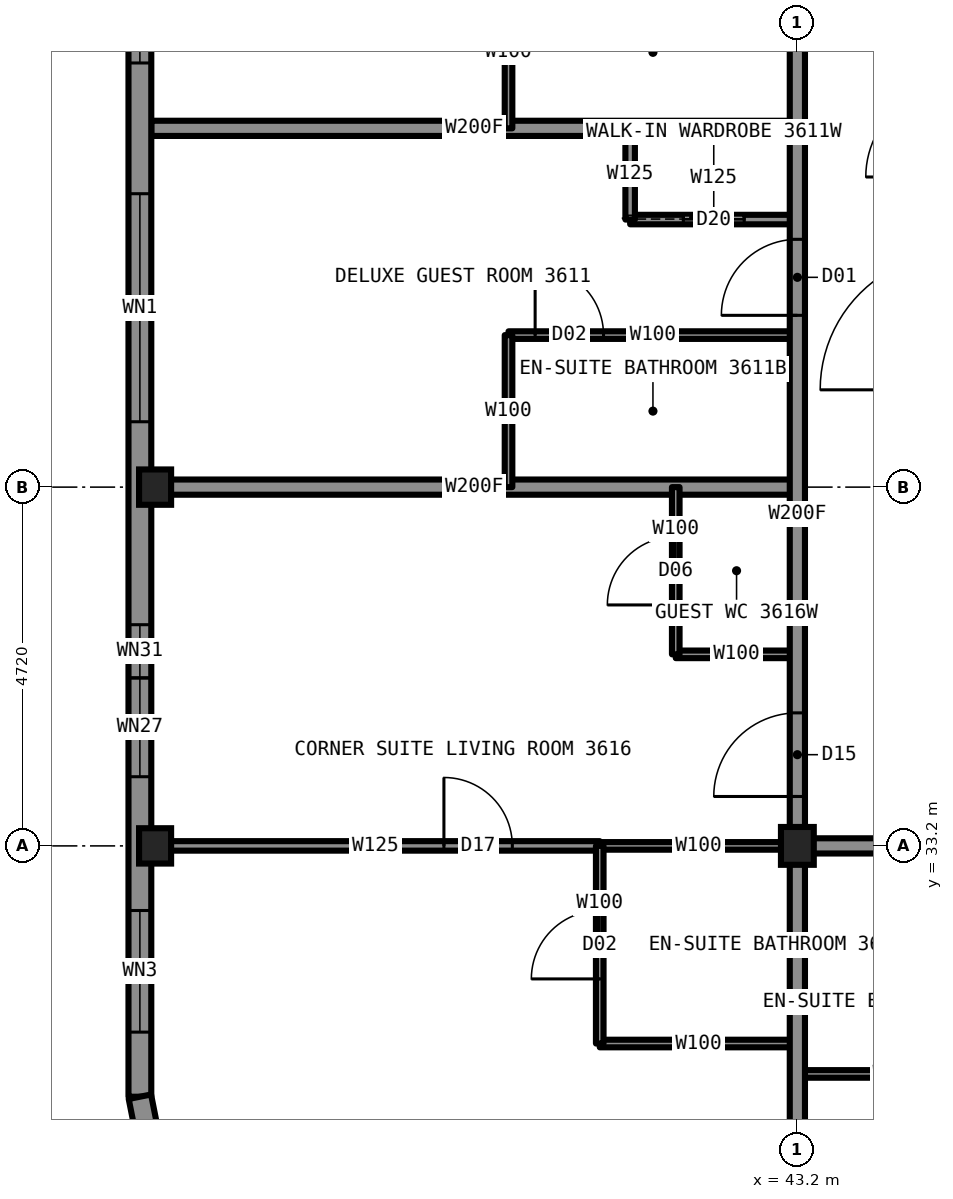
"""IFC4 building model, lengths in metres.
Left out: names, types, materials, properties, quantities, classifications, styles, units other than length and angle.
Written with IfcOpenShell. Run it as: python <this file> out.ifc"""

import sys

from ifc_helpers import new_model, si_unit, direction, frame, frame_2d, origin, origin_2d, place, context, subcontext, project, spatial, rectangle, i_section, extrude, element, fill, save


model = new_model("IFC4")
c1 = context("Model", 3, precision=1e-05, world=origin(), true_north=direction((0.0, 1.0)))
c2 = subcontext(c1, "Body", "Model", "MODEL_VIEW")
j1 = project(units=[si_unit("LENGTHUNIT", "METRE"), si_unit("PLANEANGLEUNIT", "RADIAN")], contexts=[c1])
p1 = place(None, origin())
s1 = spatial("IfcSite", under=j1, at=p1, CompositionType="ELEMENT")
p2 = place(p1, origin())
s2 = spatial("IfcBuilding", under=s1, at=p2, CompositionType="ELEMENT")
p3 = place(p2, frame((0.0, 0.0, 135.4)))
s3 = spatial("IfcBuildingStorey", under=s2, at=p3, CompositionType="ELEMENT", Elevation=135.4)
for number, where, z_axis, x_axis in (
    (1, (34.75, 33.2, 0.0), (0.0, 0.0, 1.0), (1.0, 0.0, 0.0)),
    (2, (34.75, 37.92, 0.0), (0.0, 0.0, 1.0), (1.0, 0.0, 0.0)),
):
    element("IfcColumn", number, at=place(p3, frame(where, z_axis=z_axis, x_axis=x_axis)), inside=s3, PredefinedType="COLUMN", context=c2, shape_type="SweptSolid", body=[
        extrude(i_section(OverallWidth=0.422, OverallDepth=0.465, WebThickness=0.045, FlangeThickness=0.073, at=origin_2d()), origin(), (0.0, 0.0, 1.0), 3.5),
    ])
p4 = place(p3, frame((43.2, 33.2, 0.0), z_axis=(0.0, 0.0, 1.0), x_axis=(1.0, 0.0, 0.0)))
e3 = element("IfcColumn", 3, at=p4, inside=s3, PredefinedType="COLUMN", context=c2, shape_type="SweptSolid", body=[
    extrude(i_section(OverallWidth=0.432, OverallDepth=0.498, WebThickness=0.056, FlangeThickness=0.089, at=origin_2d()), origin(), (0.0, 0.0, 1.0), 3.5),
])
p5 = place(p3, frame((40.6, 33.2, 0.0), z_axis=(0.0, 0.0, 1.0), x_axis=(1.0, 0.0, 0.0)))
e4 = element("IfcWall", 4, at=p5, inside=s3, PredefinedType="PARTITIONING", context=c2, shape_type="SweptSolid", body=[
    extrude(rectangle(XDim=2.6, YDim=0.1, at=frame_2d((1.3, 0.0))), origin(), (0.0, 0.0, 1.0), 2.573),
])
p6 = place(p3, frame((43.2, 33.2, 0.0), z_axis=(0.0, 0.0, 1.0), x_axis=(1.0, 0.0, 0.0)))
e5 = element("IfcWall", 5, at=p6, inside=s3, PredefinedType="PARTITIONING", context=c2, shape_type="SweptSolid", body=[
    extrude(rectangle(XDim=23.6, YDim=0.2, at=frame_2d((11.8, 0.0))), origin(), (0.0, 0.0, 1.0), 3.33),
])
p7 = place(p6, frame((3.0, 0.0, 0.0)))
e6 = element("IfcOpeningElement", 6, at=p7, cuts=e5, PredefinedType="OPENING", context=c2, shape_type="SweptSolid", body=[
    extrude(rectangle(XDim=1.0, YDim=2.2, at=frame_2d((0.5, 1.1))), frame((0.0, 0.11, 0.0), z_axis=(0.0, -1.0, 0.0), x_axis=(1.0, 0.0, 0.0)), (0.0, 0.0, 1.0), 0.22),
])
p8 = place(p6, frame((9.84, 0.0, 0.0)))
e7 = element("IfcOpeningElement", 7, at=p8, cuts=e5, PredefinedType="OPENING", context=c2, shape_type="SweptSolid", body=[
    extrude(rectangle(XDim=1.0, YDim=2.2, at=frame_2d((0.5, 1.1))), frame((0.0, 0.11, 0.0), z_axis=(0.0, -1.0, 0.0), x_axis=(1.0, 0.0, 0.0)), (0.0, 0.0, 1.0), 0.22),
])
p9 = place(p6, frame((16.71, 0.0, 0.0)))
e8 = element("IfcOpeningElement", 8, at=p9, cuts=e5, PredefinedType="OPENING", context=c2, shape_type="SweptSolid", body=[
    extrude(rectangle(XDim=1.0, YDim=2.2, at=frame_2d((0.5, 1.1))), frame((0.0, 0.11, 0.0), z_axis=(0.0, -1.0, 0.0), x_axis=(1.0, 0.0, 0.0)), (0.0, 0.0, 1.0), 0.22),
])
p10 = place(p6, frame((20.34, 0.0, 0.0)))
e9 = element("IfcOpeningElement", 9, at=p10, cuts=e5, PredefinedType="OPENING", context=c2, shape_type="SweptSolid", body=[
    extrude(rectangle(XDim=1.0, YDim=2.2, at=frame_2d((0.5, 1.1))), frame((0.0, 0.11, 0.0), z_axis=(0.0, -1.0, 0.0), x_axis=(1.0, 0.0, 0.0)), (0.0, 0.0, 1.0), 0.22),
])
p11 = place(p3, frame((34.7, 33.2, 0.0), z_axis=(0.0, 0.0, 1.0), x_axis=(1.0, 0.0, 0.0)))
e10 = element("IfcWall", 10, at=p11, inside=s3, PredefinedType="PARTITIONING", context=c2, shape_type="SweptSolid", body=[
    extrude(rectangle(XDim=5.9, YDim=0.125, at=frame_2d((2.95, 0.0))), origin(), (0.0, 0.0, 1.0), 2.573),
])
p12 = place(p11, frame((3.85, 0.0, 0.0)))
e11 = element("IfcOpeningElement", 11, at=p12, cuts=e10, PredefinedType="OPENING", context=c2, shape_type="SweptSolid", body=[
    extrude(rectangle(XDim=0.9, YDim=2.2, at=frame_2d((0.45, 1.1))), frame((0.0, 0.073, 0.0), z_axis=(0.0, -1.0, 0.0), x_axis=(1.0, 0.0, 0.0)), (0.0, 0.0, 1.0), 0.145),
])
p13 = place(p3, frame((40.6, 30.6, 0.0), z_axis=(0.0, 0.0, 1.0), x_axis=(1.0, 0.0, 0.0)))
e12 = element("IfcWall", 12, at=p13, inside=s3, PredefinedType="PARTITIONING", context=c2, shape_type="SweptSolid", body=[
    extrude(rectangle(XDim=2.6, YDim=0.1, at=frame_2d((1.3, 0.0))), origin(), (0.0, 0.0, 1.0), 3.33),
])
p14 = place(p3, frame((43.2, 30.2, 0.0), z_axis=(0.0, 0.0, 1.0), x_axis=(1.0, 0.0, 0.0)))
e13 = element("IfcWall", 13, at=p14, inside=s3, PredefinedType="PARTITIONING", context=c2, shape_type="SweptSolid", body=[
    extrude(rectangle(XDim=2.6, YDim=0.1, at=frame_2d((1.3, 0.0))), origin(), (0.0, 0.0, 1.0), 3.33),
])
p15 = place(p3, frame((34.7, 42.64, 0.0), z_axis=(0.0, 0.0, 1.0), x_axis=(1.0, 0.0, 0.0)))
e14 = element("IfcWall", 14, at=p15, inside=s3, PredefinedType="PARTITIONING", context=c2, shape_type="SweptSolid", body=[
    extrude(rectangle(XDim=8.5, YDim=0.2, at=frame_2d((4.25, 0.0))), origin(), (0.0, 0.0, 1.0), 2.731),
])
p16 = place(p3, frame((41.0, 41.44, 0.0), z_axis=(0.0, 0.0, 1.0), x_axis=(1.0, 0.0, 0.0)))
e15 = element("IfcWall", 15, at=p16, inside=s3, PredefinedType="PARTITIONING", context=c2, shape_type="SweptSolid", body=[
    extrude(rectangle(XDim=2.2, YDim=0.125, at=frame_2d((1.1, 0.0))), origin(), (0.0, 0.0, 1.0), 3.33),
])
p17 = place(p16, frame((0.7, 0.0, 0.0)))
e16 = element("IfcOpeningElement", 16, at=p17, cuts=e15, PredefinedType="OPENING", context=c2, shape_type="SweptSolid", body=[
    extrude(rectangle(XDim=0.8, YDim=2.1, at=frame_2d((0.4, 1.05))), frame((0.0, 0.073, 0.0), z_axis=(0.0, -1.0, 0.0), x_axis=(1.0, 0.0, 0.0)), (0.0, 0.0, 1.0), 0.145),
])
p18 = place(p3, frame((39.4, 39.92, 0.0), z_axis=(0.0, 0.0, 1.0), x_axis=(1.0, 0.0, 0.0)))
e17 = element("IfcWall", 17, at=p18, inside=s3, PredefinedType="PARTITIONING", context=c2, shape_type="SweptSolid", body=[
    extrude(rectangle(XDim=3.8, YDim=0.1, at=frame_2d((1.9, 0.0))), origin(), (0.0, 0.0, 1.0), 3.33),
])
p19 = place(p18, frame((0.35, 0.0, 0.0)))
e18 = element("IfcOpeningElement", 18, at=p19, cuts=e17, PredefinedType="OPENING", context=c2, shape_type="SweptSolid", body=[
    extrude(rectangle(XDim=0.9, YDim=2.1, at=frame_2d((0.45, 1.05))), frame((0.0, 0.06, 0.0), z_axis=(0.0, -1.0, 0.0), x_axis=(1.0, 0.0, 0.0)), (0.0, 0.0, 1.0), 0.12),
])
p20 = place(p3, frame((34.7, 37.92, 0.0), z_axis=(0.0, 0.0, 1.0), x_axis=(1.0, 0.0, 0.0)))
e19 = element("IfcWall", 19, at=p20, inside=s3, PredefinedType="PARTITIONING", context=c2, shape_type="SweptSolid", body=[
    extrude(rectangle(XDim=8.5, YDim=0.2, at=frame_2d((4.25, 0.0))), origin(), (0.0, 0.0, 1.0), 2.573),
])
p21 = place(p3, frame((41.6, 35.72, 0.0), z_axis=(0.0, 0.0, 1.0), x_axis=(1.0, 0.0, 0.0)))
e20 = element("IfcWall", 20, at=p21, inside=s3, PredefinedType="PARTITIONING", context=c2, shape_type="SweptSolid", body=[
    extrude(rectangle(XDim=1.6, YDim=0.1, at=frame_2d((0.8, 0.0))), origin(), (0.0, 0.0, 1.0), 3.33),
])
p22 = place(p3, frame((43.2, 33.2, 0.0), z_axis=(0.0, 0.0, 1.0), x_axis=(0.0, 1.0, 0.0)))
e21 = element("IfcWall", 21, at=p22, inside=s3, PredefinedType="PARTITIONING", context=c2, shape_type="SweptSolid", body=[
    extrude(rectangle(XDim=23.6, YDim=0.2, at=frame_2d((11.8, 0.0))), origin(), (0.0, 0.0, 1.0), 3.33),
])
p23 = place(p22, frame((6.98, 0.0, 0.0)))
e22 = element("IfcOpeningElement", 22, at=p23, cuts=e21, PredefinedType="OPENING", context=c2, shape_type="SweptSolid", body=[
    extrude(rectangle(XDim=1.0, YDim=2.2, at=frame_2d((0.5, 1.1))), frame((0.0, 0.11, 0.0), z_axis=(0.0, -1.0, 0.0), x_axis=(1.0, 0.0, 0.0)), (0.0, 0.0, 1.0), 0.22),
])
p24 = place(p22, frame((11.7, 0.0, 0.0)))
e23 = element("IfcOpeningElement", 23, at=p24, cuts=e21, PredefinedType="OPENING", context=c2, shape_type="SweptSolid", body=[
    extrude(rectangle(XDim=1.0, YDim=2.2, at=frame_2d((0.5, 1.1))), frame((0.0, 0.11, 0.0), z_axis=(0.0, -1.0, 0.0), x_axis=(1.0, 0.0, 0.0)), (0.0, 0.0, 1.0), 0.22),
])
p25 = place(p22, frame((15.62, 0.0, 0.0)))
e24 = element("IfcOpeningElement", 24, at=p25, cuts=e21, PredefinedType="OPENING", context=c2, shape_type="SweptSolid", body=[
    extrude(rectangle(XDim=1.0, YDim=2.2, at=frame_2d((0.5, 1.1))), frame((0.0, 0.11, 0.0), z_axis=(0.0, -1.0, 0.0), x_axis=(1.0, 0.0, 0.0)), (0.0, 0.0, 1.0), 0.22),
])
p26 = place(p22, frame((21.85, 0.0, 0.0)))
e25 = element("IfcOpeningElement", 25, at=p26, cuts=e21, PredefinedType="OPENING", context=c2, shape_type="SweptSolid", body=[
    extrude(rectangle(XDim=1.1, YDim=2.2, at=frame_2d((0.55, 1.1))), frame((0.0, 0.11, 0.0), z_axis=(0.0, -1.0, 0.0), x_axis=(1.0, 0.0, 0.0)), (0.0, 0.0, 1.0), 0.22),
])
p27 = place(p22, frame((0.65, 0.0, 0.0)))
e26 = element("IfcOpeningElement", 26, at=p27, cuts=e21, PredefinedType="OPENING", context=c2, shape_type="SweptSolid", body=[
    extrude(rectangle(XDim=1.1, YDim=2.2, at=frame_2d((0.55, 1.1))), frame((0.0, 0.11, 0.0), z_axis=(0.0, -1.0, 0.0), x_axis=(1.0, 0.0, 0.0)), (0.0, 0.0, 1.0), 0.22),
])
p28 = place(p3, frame((43.2, 24.7, 0.0), z_axis=(0.0, 0.0, 1.0), x_axis=(0.0, 1.0, 0.0)))
e27 = element("IfcWall", 27, at=p28, inside=s3, PredefinedType="PARTITIONING", context=c2, shape_type="SweptSolid", body=[
    extrude(rectangle(XDim=8.5, YDim=0.2, at=frame_2d((4.25, 0.0))), origin(), (0.0, 0.0, 1.0), 2.573),
])
p29 = place(p3, frame((41.6, 35.72, 0.0), z_axis=(0.0, 0.0, 1.0), x_axis=(0.0, 1.0, 0.0)))
e28 = element("IfcWall", 28, at=p29, inside=s3, PredefinedType="PARTITIONING", context=c2, shape_type="SweptSolid", body=[
    extrude(rectangle(XDim=2.2, YDim=0.1, at=frame_2d((1.1, 0.0))), origin(), (0.0, 0.0, 1.0), 3.33),
])
p30 = place(p29, frame((0.65, 0.0, 0.0)))
e29 = element("IfcOpeningElement", 29, at=p30, cuts=e28, PredefinedType="OPENING", context=c2, shape_type="SweptSolid", body=[
    extrude(rectangle(XDim=0.9, YDim=2.1, at=frame_2d((0.45, 1.05))), frame((0.0, 0.06, 0.0), z_axis=(0.0, -1.0, 0.0), x_axis=(1.0, 0.0, 0.0)), (0.0, 0.0, 1.0), 0.12),
])
p31 = place(p3, frame((41.0, 41.44, 0.0), z_axis=(0.0, 0.0, 1.0), x_axis=(0.0, 1.0, 0.0)))
e30 = element("IfcWall", 30, at=p31, inside=s3, PredefinedType="PARTITIONING", context=c2, shape_type="SweptSolid", body=[
    extrude(rectangle(XDim=1.2, YDim=0.125, at=frame_2d((0.6, 0.0))), origin(), (0.0, 0.0, 1.0), 3.33),
])
p32 = place(p3, frame((40.6, 30.6, 0.0), z_axis=(0.0, 0.0, 1.0), x_axis=(0.0, 1.0, 0.0)))
e31 = element("IfcWall", 31, at=p32, inside=s3, PredefinedType="PARTITIONING", context=c2, shape_type="SweptSolid", body=[
    extrude(rectangle(XDim=2.6, YDim=0.1, at=frame_2d((1.3, 0.0))), origin(), (0.0, 0.0, 1.0), 3.33),
])
p33 = place(p32, frame((0.85, 0.0, 0.0)))
e32 = element("IfcOpeningElement", 32, at=p33, cuts=e31, PredefinedType="OPENING", context=c2, shape_type="SweptSolid", body=[
    extrude(rectangle(XDim=0.9, YDim=2.1, at=frame_2d((0.45, 1.05))), frame((0.0, 0.06, 0.0), z_axis=(0.0, -1.0, 0.0), x_axis=(1.0, 0.0, 0.0)), (0.0, 0.0, 1.0), 0.12),
])
for number, where, z_axis, x_axis in (
    (33, (39.4, 37.92, 0.0), (0.0, 0.0, 1.0), (0.0, 1.0, 0.0)),
    (34, (39.4, 42.64, 0.0), (0.0, 0.0, 1.0), (0.0, 1.0, 0.0)),
):
    element("IfcWall", number, at=place(p3, frame(where, z_axis=z_axis, x_axis=x_axis)), inside=s3, PredefinedType="PARTITIONING", context=c2, shape_type="SweptSolid", body=[
        extrude(rectangle(XDim=2.0, YDim=0.1, at=frame_2d((1.0, 0.0))), origin(), (0.0, 0.0, 1.0), 3.33),
    ])
p34 = place(p3, frame((34.55, 60.1, 0.0), z_axis=(0.0, 0.0, 1.0), x_axis=(0.0, -1.0, 0.0)))
e35 = element("IfcWall", 35, at=p34, inside=s3, PredefinedType="SOLIDWALL", context=c2, shape_type="SweptSolid", body=[
    extrude(rectangle(XDim=30.2, YDim=0.3, at=frame_2d((15.1, 0.0))), origin(), (0.0, 0.0, 1.0), 2.83),
])
p35 = place(p34, frame((0.85, 0.0, 0.5)))
e36 = element("IfcOpeningElement", 36, at=p35, cuts=e35, PredefinedType="OPENING", context=c2, shape_type="SweptSolid", body=[
    extrude(rectangle(XDim=1.6, YDim=2.0, at=frame_2d((0.8, 1.0))), frame((0.0, 0.16, 0.0), z_axis=(0.0, -1.0, 0.0), x_axis=(1.0, 0.0, 0.0)), (0.0, 0.0, 1.0), 0.32),
])
p36 = place(p34, frame((4.16, 0.0, 0.5)))
e37 = element("IfcOpeningElement", 37, at=p36, cuts=e35, PredefinedType="OPENING", context=c2, shape_type="SweptSolid", body=[
    extrude(rectangle(XDim=1.3, YDim=1.9, at=frame_2d((0.65, 0.95))), frame((0.0, 0.16, 0.0), z_axis=(0.0, -1.0, 0.0), x_axis=(1.0, 0.0, 0.0)), (0.0, 0.0, 1.0), 0.32),
])
p37 = place(p34, frame((8.88, 0.0, 0.5)))
e38 = element("IfcOpeningElement", 38, at=p37, cuts=e35, PredefinedType="OPENING", context=c2, shape_type="SweptSolid", body=[
    extrude(rectangle(XDim=3.0, YDim=2.0, at=frame_2d((1.5, 1.0))), frame((0.0, 0.16, 0.0), z_axis=(0.0, -1.0, 0.0), x_axis=(1.0, 0.0, 0.0)), (0.0, 0.0, 1.0), 0.32),
])
p38 = place(p34, frame((13.6, 0.0, 0.5)))
e39 = element("IfcOpeningElement", 39, at=p38, cuts=e35, PredefinedType="OPENING", context=c2, shape_type="SweptSolid", body=[
    extrude(rectangle(XDim=3.0, YDim=2.0, at=frame_2d((1.5, 1.0))), frame((0.0, 0.16, 0.0), z_axis=(0.0, -1.0, 0.0), x_axis=(1.0, 0.0, 0.0)), (0.0, 0.0, 1.0), 0.32),
])
p39 = place(p34, frame((18.32, 0.0, 0.5)))
e40 = element("IfcOpeningElement", 40, at=p39, cuts=e35, PredefinedType="OPENING", context=c2, shape_type="SweptSolid", body=[
    extrude(rectangle(XDim=3.0, YDim=2.0, at=frame_2d((1.5, 1.0))), frame((0.0, 0.16, 0.0), z_axis=(0.0, -1.0, 0.0), x_axis=(1.0, 0.0, 0.0)), (0.0, 0.0, 1.0), 0.32),
])
p40 = place(p34, frame((24.69, 0.0, 0.5)))
e41 = element("IfcOpeningElement", 41, at=p40, cuts=e35, PredefinedType="OPENING", context=c2, shape_type="SweptSolid", body=[
    extrude(rectangle(XDim=1.3, YDim=1.9, at=frame_2d((0.65, 0.95))), frame((0.0, 0.16, 0.0), z_axis=(0.0, -1.0, 0.0), x_axis=(1.0, 0.0, 0.0)), (0.0, 0.0, 1.0), 0.32),
])
p41 = place(p34, frame((27.75, 0.0, 0.5)))
e42 = element("IfcOpeningElement", 42, at=p41, cuts=e35, PredefinedType="OPENING", context=c2, shape_type="SweptSolid", body=[
    extrude(rectangle(XDim=1.6, YDim=2.0, at=frame_2d((0.8, 1.0))), frame((0.0, 0.16, 0.0), z_axis=(0.0, -1.0, 0.0), x_axis=(1.0, 0.0, 0.0)), (0.0, 0.0, 1.0), 0.32),
])
p42 = place(p34, frame((5.51, 0.0, 0.5)))
e43 = element("IfcOpeningElement", 43, at=p42, cuts=e35, PredefinedType="OPENING", context=c2, shape_type="SweptSolid", body=[
    extrude(rectangle(XDim=0.7, YDim=0.9, at=frame_2d((0.35, 0.45))), frame((0.0, 0.16, 0.0), z_axis=(0.0, -1.0, 0.0), x_axis=(1.0, 0.0, 0.0)), (0.0, 0.0, 1.0), 0.32),
])
p43 = place(p34, frame((23.99, 0.0, 0.5)))
e44 = element("IfcOpeningElement", 44, at=p43, cuts=e35, PredefinedType="OPENING", context=c2, shape_type="SweptSolid", body=[
    extrude(rectangle(XDim=0.7, YDim=0.9, at=frame_2d((0.35, 0.45))), frame((0.0, 0.16, 0.0), z_axis=(0.0, -1.0, 0.0), x_axis=(1.0, 0.0, 0.0)), (0.0, 0.0, 1.0), 0.32),
])
p44 = place(p3, frame((34.55, 29.9, 0.0), z_axis=(0.0, 0.0, 1.0), x_axis=(0.195081421501, -0.980787050784, 0.0)))
e45 = element("IfcWall", 45, at=p44, inside=s3, PredefinedType="SOLIDWALL", context=c2, shape_type="SweptSolid", body=[
    extrude(rectangle(XDim=2.087, YDim=0.3, at=frame_2d((1.044, 0.0))), origin(), (0.0, 0.0, 1.0), 3.33),
])
p45 = place(p44, frame((0.444, 0.0, 0.5)))
e46 = element("IfcOpeningElement", 46, at=p45, cuts=e45, PredefinedType="OPENING", context=c2, shape_type="SweptSolid", body=[
    extrude(rectangle(XDim=1.2, YDim=2.0, at=frame_2d((0.6, 1.0))), frame((0.0, 0.16, 0.0), z_axis=(0.0, -1.0, 0.0), x_axis=(1.0, 0.0, 0.0)), (0.0, 0.0, 1.0), 0.32),
])
p46 = place(p23, origin())
e47 = element("IfcDoor", 47, at=p46, inside=s3, OperationType="SINGLE_SWING_LEFT", PredefinedType="DOOR", context=c2, shape_type="SweptSolid", body=[
    extrude(rectangle(XDim=1.0, YDim=2.2, at=frame_2d((0.5, 1.1))), frame((0.0, 0.025, 0.0), z_axis=(0.0, -1.0, 0.0), x_axis=(1.0, 0.0, 0.0)), (0.0, 0.0, 1.0), 0.05),
])
fill(e22, e47)
p47 = place(p19, origin())
e48 = element("IfcDoor", 48, at=p47, inside=s3, OperationType="SINGLE_SWING_RIGHT", PredefinedType="DOOR", context=c2, shape_type="SweptSolid", body=[
    extrude(rectangle(XDim=0.9, YDim=2.1, at=frame_2d((0.45, 1.05))), frame((0.0, 0.025, 0.0), z_axis=(0.0, -1.0, 0.0), x_axis=(1.0, 0.0, 0.0)), (0.0, 0.0, 1.0), 0.05),
])
fill(e18, e48)
p48 = place(p17, origin())
e49 = element("IfcDoor", 49, at=p48, inside=s3, OperationType="SLIDING_TO_LEFT", PredefinedType="DOOR", context=c2, shape_type="SweptSolid", body=[
    extrude(rectangle(XDim=0.8, YDim=2.1, at=frame_2d((0.4, 1.05))), frame((0.0, 0.025, 0.0), z_axis=(0.0, -1.0, 0.0), x_axis=(1.0, 0.0, 0.0)), (0.0, 0.0, 1.0), 0.05),
])
fill(e16, e49)
p49 = place(p27, origin())
e50 = element("IfcDoor", 50, at=p49, inside=s3, OperationType="SINGLE_SWING_LEFT", PredefinedType="DOOR", context=c2, shape_type="SweptSolid", body=[
    extrude(rectangle(XDim=1.1, YDim=2.2, at=frame_2d((0.55, 1.1))), frame((0.0, 0.025, 0.0), z_axis=(0.0, -1.0, 0.0), x_axis=(1.0, 0.0, 0.0)), (0.0, 0.0, 1.0), 0.05),
])
fill(e26, e50)
p50 = place(p33, origin())
e51 = element("IfcDoor", 51, at=p50, inside=s3, OperationType="SINGLE_SWING_RIGHT", PredefinedType="DOOR", context=c2, shape_type="SweptSolid", body=[
    extrude(rectangle(XDim=0.9, YDim=2.1, at=frame_2d((0.45, 1.05))), frame((0.0, 0.025, 0.0), z_axis=(0.0, -1.0, 0.0), x_axis=(1.0, 0.0, 0.0)), (0.0, 0.0, 1.0), 0.05),
])
fill(e32, e51)
p51 = place(p12, origin())
e52 = element("IfcDoor", 52, at=p51, inside=s3, OperationType="SINGLE_SWING_LEFT", PredefinedType="DOOR", context=c2, shape_type="SweptSolid", body=[
    extrude(rectangle(XDim=0.9, YDim=2.2, at=frame_2d((0.45, 1.1))), frame((0.0, 0.025, 0.0), z_axis=(0.0, -1.0, 0.0), x_axis=(1.0, 0.0, 0.0)), (0.0, 0.0, 1.0), 0.05),
])
fill(e11, e52)
p52 = place(p30, origin())
e53 = element("IfcDoor", 53, at=p52, inside=s3, OperationType="SINGLE_SWING_LEFT", PredefinedType="DOOR", context=c2, shape_type="SweptSolid", body=[
    extrude(rectangle(XDim=0.9, YDim=2.1, at=frame_2d((0.45, 1.05))), frame((0.0, 0.025, 0.0), z_axis=(0.0, -1.0, 0.0), x_axis=(1.0, 0.0, 0.0)), (0.0, 0.0, 1.0), 0.05),
])
fill(e29, e53)
p53 = place(p38, origin())
e54 = element("IfcWindow", 54, at=p53, inside=s3, PartitioningType="SINGLE_PANEL", PredefinedType="WINDOW", context=c2, shape_type="SweptSolid", body=[
    extrude(rectangle(XDim=3.0, YDim=2.0, at=frame_2d((1.5, 1.0))), frame((0.0, 0.03, 0.0), z_axis=(0.0, -1.0, 0.0), x_axis=(1.0, 0.0, 0.0)), (0.0, 0.0, 1.0), 0.06),
])
fill(e39, e54)
p54 = place(p39, origin())
e55 = element("IfcWindow", 55, at=p54, inside=s3, PartitioningType="SINGLE_PANEL", PredefinedType="WINDOW", context=c2, shape_type="SweptSolid", body=[
    extrude(rectangle(XDim=3.0, YDim=2.0, at=frame_2d((1.5, 1.0))), frame((0.0, 0.03, 0.0), z_axis=(0.0, -1.0, 0.0), x_axis=(1.0, 0.0, 0.0)), (0.0, 0.0, 1.0), 0.06),
])
fill(e40, e55)
p55 = place(p40, origin())
e56 = element("IfcWindow", 56, at=p55, inside=s3, PartitioningType="SINGLE_PANEL", PredefinedType="WINDOW", context=c2, shape_type="SweptSolid", body=[
    extrude(rectangle(XDim=1.3, YDim=1.9, at=frame_2d((0.65, 0.95))), frame((0.0, 0.03, 0.0), z_axis=(0.0, -1.0, 0.0), x_axis=(1.0, 0.0, 0.0)), (0.0, 0.0, 1.0), 0.06),
])
fill(e41, e56)
p56 = place(p41, origin())
e57 = element("IfcWindow", 57, at=p56, inside=s3, PartitioningType="SINGLE_PANEL", PredefinedType="WINDOW", context=c2, shape_type="SweptSolid", body=[
    extrude(rectangle(XDim=1.6, YDim=2.0, at=frame_2d((0.8, 1.0))), frame((0.0, 0.03, 0.0), z_axis=(0.0, -1.0, 0.0), x_axis=(1.0, 0.0, 0.0)), (0.0, 0.0, 1.0), 0.06),
])
fill(e42, e57)
p57 = place(p43, origin())
e58 = element("IfcWindow", 58, at=p57, inside=s3, PartitioningType="SINGLE_PANEL", PredefinedType="WINDOW", context=c2, shape_type="SweptSolid", body=[
    extrude(rectangle(XDim=0.7, YDim=0.9, at=frame_2d((0.35, 0.45))), frame((0.0, 0.03, 0.0), z_axis=(0.0, -1.0, 0.0), x_axis=(1.0, 0.0, 0.0)), (0.0, 0.0, 1.0), 0.06),
])
fill(e44, e58)
save(model, sys.argv[1])
